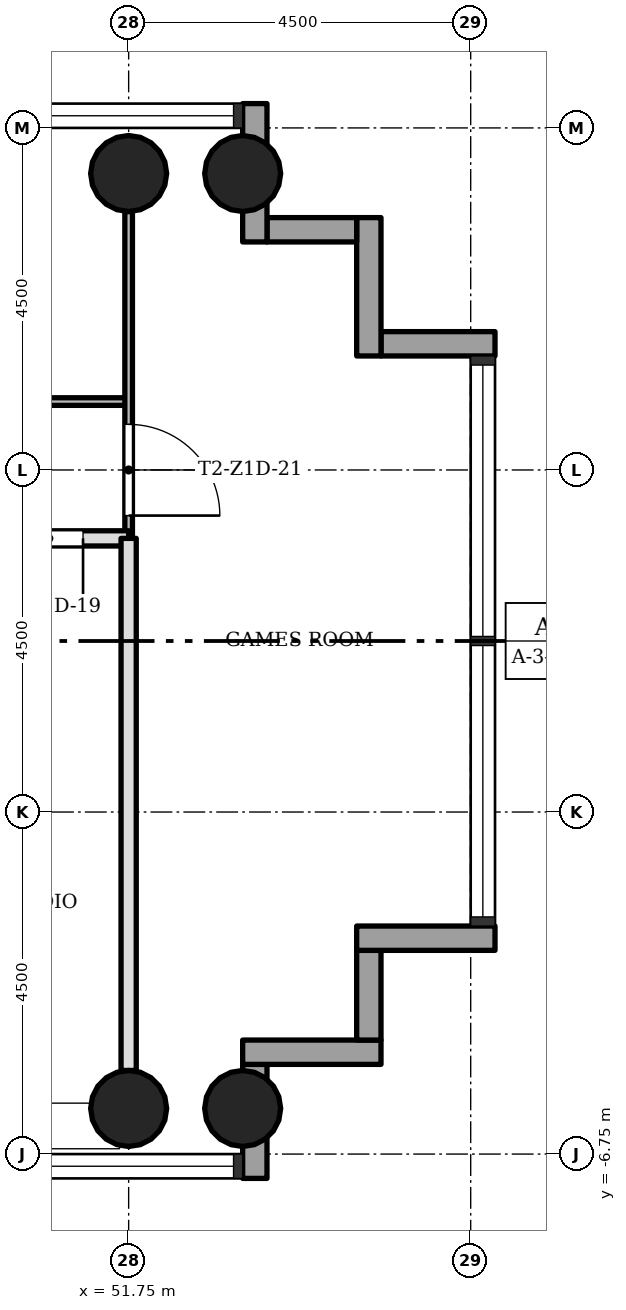
"""IFC4 building model, lengths in metres.
Left out: names, types, materials, properties, quantities, classifications, styles, units other than length and angle.
Written with IfcOpenShell. Run it as: python <this file> out.ifc"""

import sys

from ifc_helpers import new_model, si_unit, direction, frame, frame_2d, origin, origin_2d, place, context, subcontext, project, spatial, rectangle, hollow_circle, extrude, element, fill, save


model = new_model("IFC4")
c1 = context("Model", 3, precision=1e-05, world=origin(), true_north=direction((0.0, 1.0)))
c2 = subcontext(c1, "Body", "Model", "MODEL_VIEW")
j1 = project(units=[si_unit("LENGTHUNIT", "METRE"), si_unit("PLANEANGLEUNIT", "RADIAN")], contexts=[c1])
p1 = place(None, origin())
s1 = spatial("IfcSite", under=j1, at=p1, CompositionType="ELEMENT")
p2 = place(p1, origin())
s2 = spatial("IfcBuilding", under=s1, at=p2, CompositionType="ELEMENT")
p3 = place(p2, frame((0.0, 0.0, 61.9)))
s3 = spatial("IfcBuildingStorey", under=s2, at=p3, CompositionType="ELEMENT", Elevation=61.9)
for number, where, z_axis, x_axis in (
    (1, (51.75, -6.15, 0.0), (0.0, 0.0, 1.0), (1.0, 0.0, 0.0)),
    (2, (51.75, 6.15, 0.0), (0.0, 0.0, 1.0), (1.0, 0.0, 0.0)),
    (3, (53.25, -6.15, 0.0), (0.0, 0.0, 1.0), (1.0, 0.0, 0.0)),
    (4, (53.25, 6.15, 0.0), (0.0, 0.0, 1.0), (1.0, 0.0, 0.0)),
):
    element("IfcColumn", number, at=place(p3, frame(where, z_axis=z_axis, x_axis=x_axis)), inside=s3, PredefinedType="COLUMN", context=c2, shape_type="SweptSolid", body=[
        extrude(hollow_circle(Radius=0.5, WallThickness=0.036, at=origin_2d()), origin(), (0.0, 0.0, 1.0), 3.4),
    ])
p4 = place(p3, frame((53.41, -7.07, -0.3), z_axis=(0.0, 0.0, 1.0), x_axis=(0.0, 1.0, 0.0)))
e5 = element("IfcWall", 5, at=p4, inside=s3, PredefinedType="STANDARD", context=c2, shape_type="SweptSolid", body=[
    extrude(rectangle(XDim=1.5, YDim=0.32, at=frame_2d((0.75, 0.0))), origin(), (0.0, 0.0, 1.0), 3.4),
])
p5 = place(p3, frame((53.25, -5.41, -0.3), z_axis=(0.0, 0.0, 1.0), x_axis=(1.0, 0.0, 0.0)))
e6 = element("IfcWall", 6, at=p5, inside=s3, PredefinedType="STANDARD", context=c2, shape_type="SweptSolid", body=[
    extrude(rectangle(XDim=1.82, YDim=0.32, at=frame_2d((0.91, 0.0))), origin(), (0.0, 0.0, 1.0), 3.4),
])
p6 = place(p3, frame((54.91, -5.25, -0.3), z_axis=(0.0, 0.0, 1.0), x_axis=(0.0, 1.0, 0.0)))
e7 = element("IfcWall", 7, at=p6, inside=s3, PredefinedType="STANDARD", context=c2, shape_type="SweptSolid", body=[
    extrude(rectangle(XDim=1.18, YDim=0.32, at=frame_2d((0.59, 0.0))), origin(), (0.0, 0.0, 1.0), 3.4),
])
p7 = place(p3, frame((54.75, -3.91, -0.3), z_axis=(0.0, 0.0, 1.0), x_axis=(1.0, 0.0, 0.0)))
e8 = element("IfcWall", 8, at=p7, inside=s3, PredefinedType="STANDARD", context=c2, shape_type="SweptSolid", body=[
    extrude(rectangle(XDim=1.82, YDim=0.32, at=frame_2d((0.91, 0.0))), origin(), (0.0, 0.0, 1.0), 3.4),
])
p8 = place(p3, frame((56.57, 3.91, -0.3), z_axis=(0.0, 0.0, 1.0), x_axis=(-1.0, 0.0, 0.0)))
e9 = element("IfcWall", 9, at=p8, inside=s3, PredefinedType="STANDARD", context=c2, shape_type="SweptSolid", body=[
    extrude(rectangle(XDim=1.5, YDim=0.32, at=frame_2d((0.75, 0.0))), origin(), (0.0, 0.0, 1.0), 3.4),
])
p9 = place(p3, frame((54.91, 3.75, -0.3), z_axis=(0.0, 0.0, 1.0), x_axis=(0.0, 1.0, 0.0)))
e10 = element("IfcWall", 10, at=p9, inside=s3, PredefinedType="STANDARD", context=c2, shape_type="SweptSolid", body=[
    extrude(rectangle(XDim=1.82, YDim=0.32, at=frame_2d((0.91, 0.0))), origin(), (0.0, 0.0, 1.0), 3.4),
])
p10 = place(p3, frame((54.75, 5.41, -0.3), z_axis=(0.0, 0.0, 1.0), x_axis=(-1.0, 0.0, 0.0)))
e11 = element("IfcWall", 11, at=p10, inside=s3, PredefinedType="STANDARD", context=c2, shape_type="SweptSolid", body=[
    extrude(rectangle(XDim=1.18, YDim=0.32, at=frame_2d((0.59, 0.0))), origin(), (0.0, 0.0, 1.0), 3.4),
])
p11 = place(p3, frame((53.41, 5.25, -0.3), z_axis=(0.0, 0.0, 1.0), x_axis=(0.0, 1.0, 0.0)))
e12 = element("IfcWall", 12, at=p11, inside=s3, PredefinedType="STANDARD", context=c2, shape_type="SweptSolid", body=[
    extrude(rectangle(XDim=1.82, YDim=0.32, at=frame_2d((0.91, 0.0))), origin(), (0.0, 0.0, 1.0), 3.4),
])
p12 = place(p3, frame((51.75, 1.35, 0.0), z_axis=(0.0, 0.0, 1.0), x_axis=(-1.0, 0.0, 0.0)))
e13 = element("IfcWall", 13, at=p12, inside=s3, PredefinedType="SOLIDWALL", context=c2, shape_type="SweptSolid", body=[
    extrude(rectangle(XDim=4.5, YDim=0.2, at=frame_2d((2.25, 0.0))), origin(), (0.0, 0.0, 1.0), 3.0),
])
p13 = place(p12, frame((0.6, 0.0, 0.0)))
e14 = element("IfcOpeningElement", 14, at=p13, cuts=e13, PredefinedType="OPENING", context=c2, shape_type="SweptSolid", body=[
    extrude(rectangle(XDim=0.9, YDim=2.1, at=frame_2d((0.45, 1.05))), frame((0.0, 0.11, 0.0), z_axis=(0.0, -1.0, 0.0), x_axis=(1.0, 0.0, 0.0)), (0.0, 0.0, 1.0), 0.22),
])
p14 = place(p3, frame((51.75, 3.15, 0.0), z_axis=(0.0, 0.0, 1.0), x_axis=(-1.0, 0.0, 0.0)))
e15 = element("IfcWall", 15, at=p14, inside=s3, PredefinedType="PARTITIONING", context=c2, shape_type="SweptSolid", body=[
    extrude(rectangle(XDim=9.0, YDim=0.1, at=frame_2d((4.5, 0.0))), origin(), (0.0, 0.0, 1.0), 3.0),
])
p15 = place(p14, frame((6.3, 0.0, 0.0)))
e16 = element("IfcOpeningElement", 16, at=p15, cuts=e15, PredefinedType="OPENING", context=c2, shape_type="SweptSolid", body=[
    extrude(rectangle(XDim=0.9, YDim=2.1, at=frame_2d((0.45, 1.05))), frame((0.0, 0.06, 0.0), z_axis=(0.0, -1.0, 0.0), x_axis=(1.0, 0.0, 0.0)), (0.0, 0.0, 1.0), 0.12),
])
p16 = place(p14, frame((1.8, 0.0, 0.0)))
e17 = element("IfcOpeningElement", 17, at=p16, cuts=e15, PredefinedType="OPENING", context=c2, shape_type="SweptSolid", body=[
    extrude(rectangle(XDim=0.9, YDim=2.1, at=frame_2d((0.45, 1.05))), frame((0.0, 0.06, 0.0), z_axis=(0.0, -1.0, 0.0), x_axis=(1.0, 0.0, 0.0)), (0.0, 0.0, 1.0), 0.12),
])
p17 = place(p3, frame((51.75, 1.35, 0.0), z_axis=(0.0, 0.0, 1.0), x_axis=(0.0, 1.0, 0.0)))
e18 = element("IfcWall", 18, at=p17, inside=s3, PredefinedType="PARTITIONING", context=c2, shape_type="SweptSolid", body=[
    extrude(rectangle(XDim=4.3, YDim=0.1, at=frame_2d((2.15, 0.0))), origin(), (0.0, 0.0, 1.0), 3.0),
])
p18 = place(p17, frame((0.3, 0.0, 0.0)))
e19 = element("IfcOpeningElement", 19, at=p18, cuts=e18, PredefinedType="OPENING", context=c2, shape_type="SweptSolid", body=[
    extrude(rectangle(XDim=1.2, YDim=2.1, at=frame_2d((0.6, 1.05))), frame((0.0, 0.06, 0.0), z_axis=(0.0, -1.0, 0.0), x_axis=(1.0, 0.0, 0.0)), (0.0, 0.0, 1.0), 0.12),
])
p19 = place(p3, frame((51.75, -5.65, 0.0), z_axis=(0.0, 0.0, 1.0), x_axis=(0.0, 1.0, 0.0)))
e20 = element("IfcWall", 20, at=p19, inside=s3, PredefinedType="SOLIDWALL", context=c2, shape_type="SweptSolid", body=[
    extrude(rectangle(XDim=7.0, YDim=0.2, at=frame_2d((3.5, 0.0))), origin(), (0.0, 0.0, 1.0), 3.0),
])
p20 = place(p13, origin())
e21 = element("IfcDoor", 21, at=p20, inside=s3, OperationType="SINGLE_SWING_RIGHT", PredefinedType="DOOR", context=c2, shape_type="SweptSolid", body=[
    extrude(rectangle(XDim=0.9, YDim=2.1, at=frame_2d((0.45, 1.05))), frame((0.0, 0.025, 0.0), z_axis=(0.0, -1.0, 0.0), x_axis=(1.0, 0.0, 0.0)), (0.0, 0.0, 1.0), 0.05),
])
fill(e14, e21)
p21 = place(p18, origin())
e22 = element("IfcDoor", 22, at=p21, inside=s3, OperationType="SINGLE_SWING_LEFT", PredefinedType="DOOR", context=c2, shape_type="SweptSolid", body=[
    extrude(rectangle(XDim=1.2, YDim=2.1, at=frame_2d((0.6, 1.05))), frame((0.0, 0.025, 0.0), z_axis=(0.0, -1.0, 0.0), x_axis=(1.0, 0.0, 0.0)), (0.0, 0.0, 1.0), 0.05),
])
fill(e19, e22)
save(model, sys.argv[1])
